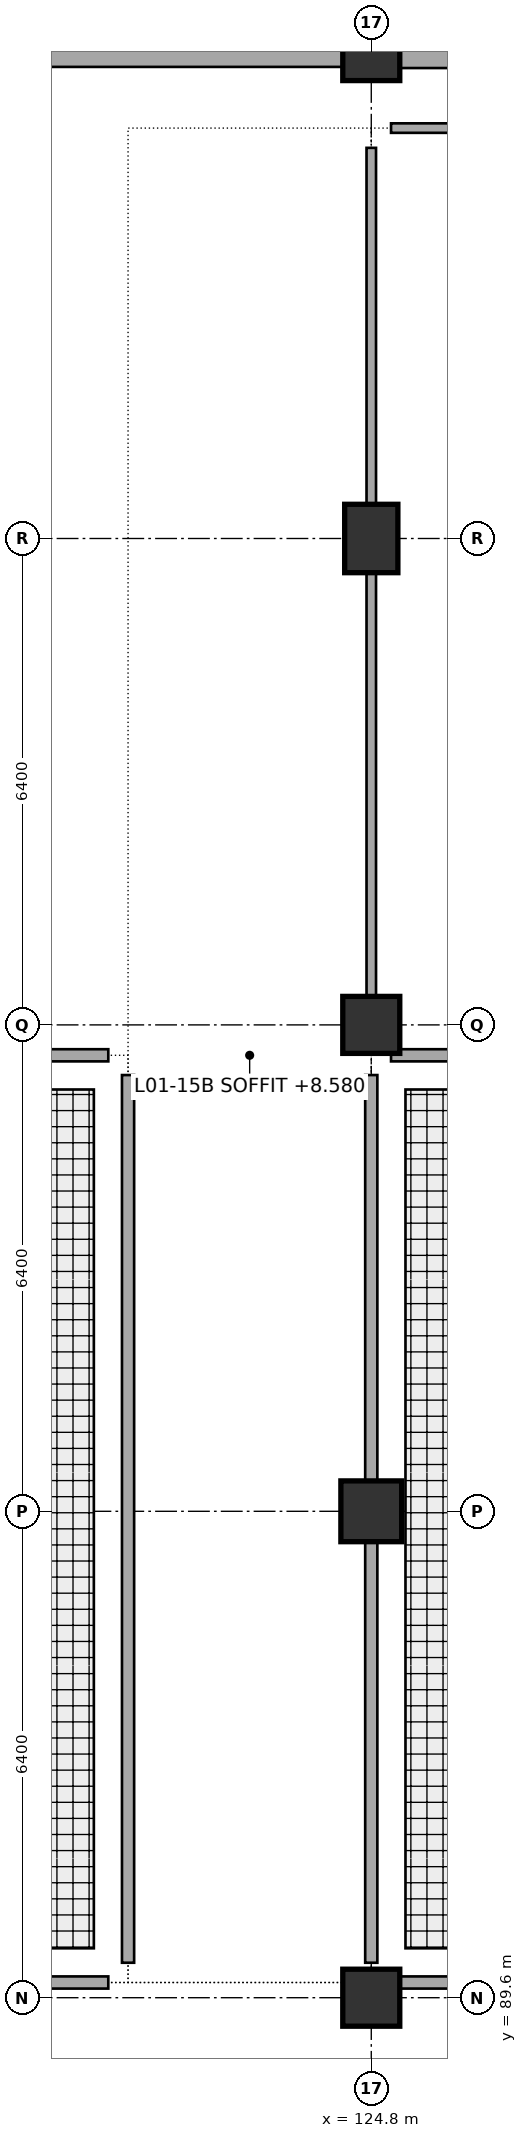
"""IFC4 building model, lengths in metres.
Left out: names, types, materials, properties, quantities, classifications, styles, units other than length and angle.
Written with IfcOpenShell. Run it as: python <this file> out.ifc"""

import sys

from ifc_helpers import new_model, si_unit, direction, frame, frame_2d, origin, origin_2d, place, context, subcontext, project, spatial, rectangle, extrude, element, fill, save


model = new_model("IFC4")
c1 = context("Model", 3, precision=1e-05, world=origin(), true_north=direction((0.0, 1.0)))
c2 = subcontext(c1, "Body", "Model", "MODEL_VIEW")
j1 = project(units=[si_unit("LENGTHUNIT", "METRE"), si_unit("PLANEANGLEUNIT", "RADIAN")], contexts=[c1])
p1 = place(None, origin())
s1 = spatial("IfcSite", under=j1, at=p1, CompositionType="ELEMENT")
p2 = place(p1, origin())
s2 = spatial("IfcBuilding", under=s1, at=p2, CompositionType="ELEMENT")
p3 = place(p2, frame((0.0, 0.0, 4.8)))
s3 = spatial("IfcBuildingStorey", under=s2, at=p3, CompositionType="ELEMENT", Elevation=4.8)
p4 = place(p3, frame((124.8, 89.6, 0.0), z_axis=(0.0, 0.0, 1.0), x_axis=(1.0, 0.0, 0.0)))
e1 = element("IfcColumn", 1, at=p4, inside=s3, PredefinedType="COLUMN", context=c2, shape_type="SweptSolid", body=[
    extrude(rectangle(XDim=0.75, YDim=0.75, at=origin_2d()), origin(), (0.0, 0.0, 1.0), 4.2),
])
p5 = place(p3, frame((124.8, 96.0, 0.0), z_axis=(0.0, 0.0, 1.0), x_axis=(1.0, 0.0, 0.0)))
e2 = element("IfcColumn", 2, at=p5, inside=s3, PredefinedType="COLUMN", context=c2, shape_type="SweptSolid", body=[
    extrude(rectangle(XDim=0.8, YDim=0.8, at=origin_2d()), origin(), (0.0, 0.0, 1.0), 4.2),
])
p6 = place(p3, frame((124.8, 102.4, 0.0), z_axis=(0.0, 0.0, 1.0), x_axis=(1.0, 0.0, 0.0)))
e3 = element("IfcColumn", 3, at=p6, inside=s3, PredefinedType="COLUMN", context=c2, shape_type="SweptSolid", body=[
    extrude(rectangle(XDim=0.75, YDim=0.75, at=origin_2d()), origin(), (0.0, 0.0, 1.0), 4.2),
])
p7 = place(p3, frame((124.8, 108.8, 0.0), z_axis=(0.0, 0.0, 1.0), x_axis=(1.0, 0.0, 0.0)))
e4 = element("IfcColumn", 4, at=p7, inside=s3, PredefinedType="COLUMN", context=c2, shape_type="SweptSolid", body=[
    extrude(rectangle(XDim=0.7, YDim=0.9, at=origin_2d()), origin(), (0.0, 0.0, 1.0), 4.2),
])
p8 = place(p3, frame((124.8, 115.2, 0.0), z_axis=(0.0, 0.0, 1.0), x_axis=(1.0, 0.0, 0.0)))
e5 = element("IfcColumn", 5, at=p8, inside=s3, PredefinedType="COLUMN", context=c2, shape_type="SweptSolid", body=[
    extrude(rectangle(XDim=0.75, YDim=0.75, at=origin_2d()), origin(), (0.0, 0.0, 1.0), 4.2),
])
p9 = place(p3, frame((117.6, 115.2, 0.0), z_axis=(0.0, 0.0, 1.0), x_axis=(1.0, 0.0, 0.0)))
e6 = element("IfcWall", 6, at=p9, inside=s3, PredefinedType="STANDARD", context=c2, shape_type="SweptSolid", body=[
    extrude(rectangle(XDim=7.2, YDim=0.39, at=frame_2d((3.6, 0.0))), origin(), (0.0, 0.0, 1.0), 3.29),
])
p10 = place(p9, frame((2.7, 0.0, 0.8)))
e7 = element("IfcOpeningElement", 7, at=p10, cuts=e6, PredefinedType="OPENING", context=c2, shape_type="SweptSolid", body=[
    extrude(rectangle(XDim=1.8, YDim=1.65, at=frame_2d((0.9, 0.825))), frame((0.0, 0.205, 0.0), z_axis=(0.0, -1.0, 0.0), x_axis=(1.0, 0.0, 0.0)), (0.0, 0.0, 1.0), 0.41),
])
p11 = place(p3, frame((124.8, 115.2, 0.0), z_axis=(0.0, 0.0, 1.0), x_axis=(1.0, 0.0, 0.0)))
e8 = element("IfcWall", 8, at=p11, inside=s3, PredefinedType="STANDARD", context=c2, shape_type="SweptSolid", body=[
    extrude(rectangle(XDim=7.2, YDim=0.42, at=frame_2d((3.6, 0.0))), origin(), (0.0, 0.0, 1.0), 3.84),
])
p12 = place(p11, frame((2.55, 0.0, 0.8)))
e9 = element("IfcOpeningElement", 9, at=p12, cuts=e8, PredefinedType="OPENING", context=c2, shape_type="SweptSolid", body=[
    extrude(rectangle(XDim=2.1, YDim=1.65, at=frame_2d((1.05, 0.825))), frame((0.0, 0.22, 0.0), z_axis=(0.0, -1.0, 0.0), x_axis=(1.0, 0.0, 0.0)), (0.0, 0.0, 1.0), 0.44),
])
p13 = place(p3, frame((109.86, 89.8, 0.0), z_axis=(0.0, 0.0, 1.0), x_axis=(1.0, 0.0, 0.0)))
e10 = element("IfcWall", 10, at=p13, inside=s3, PredefinedType="PARTITIONING", context=c2, shape_type="SweptSolid", body=[
    extrude(rectangle(XDim=11.48, YDim=0.16, at=frame_2d((5.74, 0.0))), origin(), (0.0, 0.0, 1.0), 3.165),
])
p14 = place(p13, frame((5.14, 0.0, 0.0)))
e11 = element("IfcOpeningElement", 11, at=p14, cuts=e10, PredefinedType="OPENING", context=c2, shape_type="SweptSolid", body=[
    extrude(rectangle(XDim=1.2, YDim=2.15, at=frame_2d((0.6, 1.075))), frame((0.0, 0.09, 0.0), z_axis=(0.0, -1.0, 0.0), x_axis=(1.0, 0.0, 0.0)), (0.0, 0.0, 1.0), 0.18),
])
p15 = place(p3, frame((121.6, 90.06, 0.0), z_axis=(0.0, 0.0, 1.0), x_axis=(0.0, 1.0, 0.0)))
e12 = element("IfcWall", 12, at=p15, inside=s3, PredefinedType="PARTITIONING", context=c2, shape_type="SweptSolid", body=[
    extrude(rectangle(XDim=11.68, YDim=0.16, at=frame_2d((5.84, 0.0))), origin(), (0.0, 0.0, 1.0), 3.415),
])
p16 = place(p3, frame((121.34, 102.0, 0.0), z_axis=(0.0, 0.0, 1.0), x_axis=(-1.0, 0.0, 0.0)))
e13 = element("IfcWall", 13, at=p16, inside=s3, PredefinedType="PARTITIONING", context=c2, shape_type="SweptSolid", body=[
    extrude(rectangle(XDim=11.48, YDim=0.16, at=frame_2d((5.74, 0.0))), origin(), (0.0, 0.0, 1.0), 3.065),
])
p17 = place(p3, frame((125.06, 89.8, 0.0), z_axis=(0.0, 0.0, 1.0), x_axis=(1.0, 0.0, 0.0)))
e14 = element("IfcWall", 14, at=p17, inside=s3, PredefinedType="PARTITIONING", context=c2, shape_type="SweptSolid", body=[
    extrude(rectangle(XDim=20.08, YDim=0.16, at=frame_2d((10.04, 0.0))), origin(), (0.0, 0.0, 1.0), 3.065),
])
p18 = place(p3, frame((145.14, 102.0, 0.0), z_axis=(0.0, 0.0, 1.0), x_axis=(-1.0, 0.0, 0.0)))
e15 = element("IfcWall", 15, at=p18, inside=s3, PredefinedType="PARTITIONING", context=c2, shape_type="SweptSolid", body=[
    extrude(rectangle(XDim=20.08, YDim=0.16, at=frame_2d((10.04, 0.0))), origin(), (0.0, 0.0, 1.0), 3.015),
])
p19 = place(p3, frame((124.8, 101.74, 0.0), z_axis=(0.0, 0.0, 1.0), x_axis=(0.0, -1.0, 0.0)))
e16 = element("IfcWall", 16, at=p19, inside=s3, PredefinedType="PARTITIONING", context=c2, shape_type="SweptSolid", body=[
    extrude(rectangle(XDim=11.68, YDim=0.16, at=frame_2d((5.84, 0.0))), origin(), (0.0, 0.0, 1.0), 2.665),
])
p20 = place(p19, frame((6.84, 0.0, 0.0)))
e17 = element("IfcOpeningElement", 17, at=p20, cuts=e16, PredefinedType="OPENING", context=c2, shape_type="SweptSolid", body=[
    extrude(rectangle(XDim=1.2, YDim=2.15, at=frame_2d((0.6, 1.075))), frame((0.0, 0.09, 0.0), z_axis=(0.0, -1.0, 0.0), x_axis=(1.0, 0.0, 0.0)), (0.0, 0.0, 1.0), 0.18),
])
p21 = place(p3, frame((145.14, 114.2, 0.0), z_axis=(0.0, 0.0, 1.0), x_axis=(-1.0, 0.0, 0.0)))
e18 = element("IfcWall", 18, at=p21, inside=s3, PredefinedType="PARTITIONING", context=c2, shape_type="SweptSolid", body=[
    extrude(rectangle(XDim=20.08, YDim=0.125, at=frame_2d((10.04, 0.0))), origin(), (0.0, 0.0, 1.0), 3.84),
])
p22 = place(p3, frame((124.8, 113.94, 0.0), z_axis=(0.0, 0.0, 1.0), x_axis=(0.0, -1.0, 0.0)))
e19 = element("IfcWall", 19, at=p22, inside=s3, PredefinedType="PARTITIONING", context=c2, shape_type="SweptSolid", body=[
    extrude(rectangle(XDim=11.68, YDim=0.125, at=frame_2d((5.84, 0.0))), origin(), (0.0, 0.0, 1.0), 2.615),
])
p23 = place(p22, frame((6.15, 0.0, 0.0)))
e20 = element("IfcOpeningElement", 20, at=p23, cuts=e19, PredefinedType="OPENING", context=c2, shape_type="SweptSolid", body=[
    extrude(rectangle(XDim=0.98, YDim=2.1, at=frame_2d((0.49, 1.05))), frame((0.0, 0.073, 0.0), z_axis=(0.0, -1.0, 0.0), x_axis=(1.0, 0.0, 0.0)), (0.0, 0.0, 1.0), 0.145),
])
p24 = place(p10, origin())
e21 = element("IfcWindow", 21, at=p24, inside=s3, PartitioningType="SINGLE_PANEL", PredefinedType="WINDOW", context=c2, shape_type="SweptSolid", body=[
    extrude(rectangle(XDim=1.8, YDim=1.65, at=frame_2d((0.9, 0.825))), frame((0.0, 0.03, 0.0), z_axis=(0.0, -1.0, 0.0), x_axis=(1.0, 0.0, 0.0)), (0.0, 0.0, 1.0), 0.06),
])
fill(e7, e21)
p25 = place(p20, origin())
e22 = element("IfcDoor", 22, at=p25, inside=s3, OperationType="SINGLE_SWING_RIGHT", PredefinedType="DOOR", context=c2, shape_type="SweptSolid", body=[
    extrude(rectangle(XDim=1.2, YDim=2.15, at=frame_2d((0.6, 1.075))), frame((0.0, 0.025, 0.0), z_axis=(0.0, -1.0, 0.0), x_axis=(1.0, 0.0, 0.0)), (0.0, 0.0, 1.0), 0.05),
])
fill(e17, e22)
p26 = place(p23, origin())
e23 = element("IfcDoor", 23, at=p26, inside=s3, OperationType="SINGLE_SWING_LEFT", PredefinedType="DOOR", context=c2, shape_type="SweptSolid", body=[
    extrude(rectangle(XDim=0.98, YDim=2.1, at=frame_2d((0.49, 1.05))), frame((0.0, 0.025, 0.0), z_axis=(0.0, -1.0, 0.0), x_axis=(1.0, 0.0, 0.0)), (0.0, 0.0, 1.0), 0.05),
])
fill(e20, e23)
save(model, sys.argv[1])
